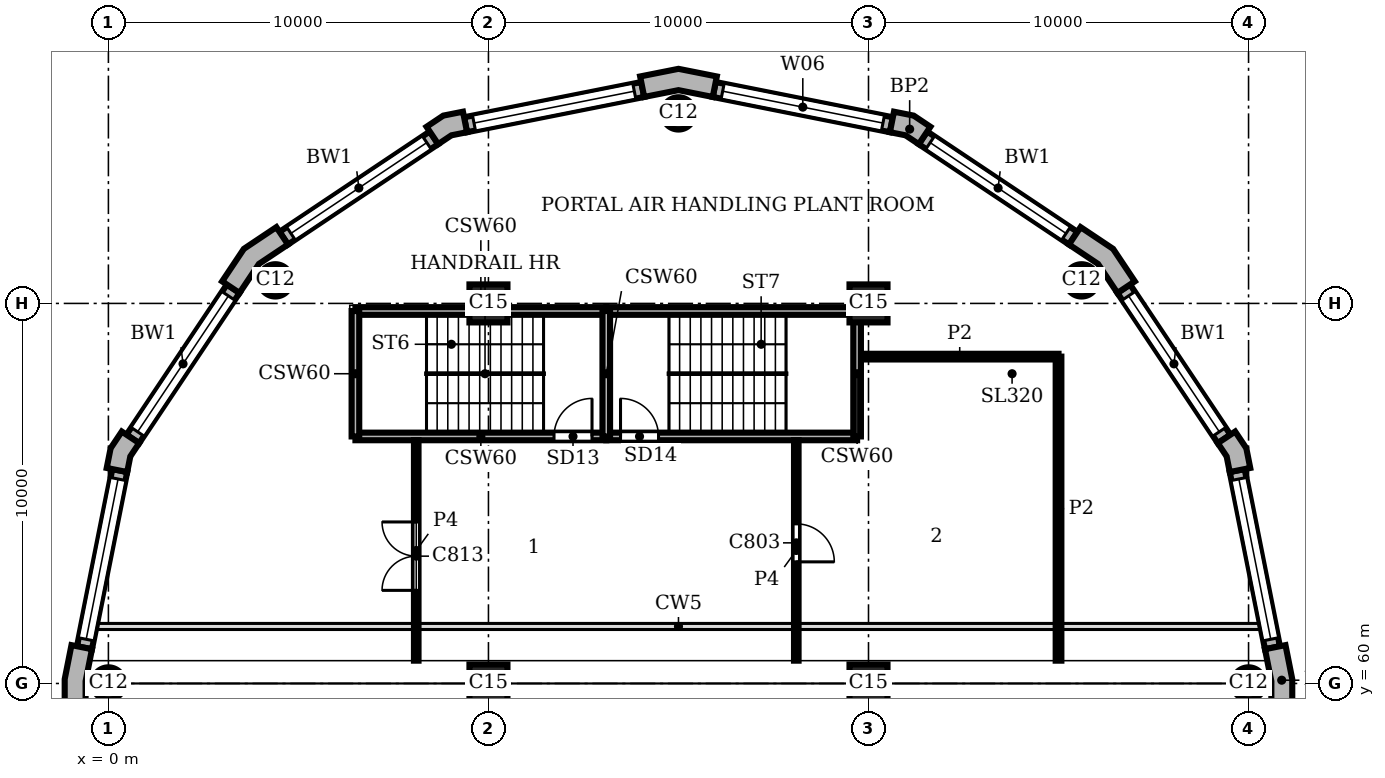
"""IFC4 building model, lengths in metres.
Left out: names, types, materials, properties, quantities, classifications, styles, units other than length and angle.
Written with IfcOpenShell. Run it as: python <this file> out.ifc"""

import sys

from ifc_helpers import new_model, si_unit, direction, frame, frame_2d, origin, origin_2d, place, context, subcontext, project, spatial, polyline, rectangle, circle, outline, extrude, element, fill, save


model = new_model("IFC4")
c1 = context("Model", 3, precision=1e-05, world=origin(), true_north=direction((0.0, 1.0)))
c2 = subcontext(c1, "Body", "Model", "MODEL_VIEW")
j1 = project(units=[si_unit("LENGTHUNIT", "METRE"), si_unit("PLANEANGLEUNIT", "RADIAN")], contexts=[c1])
p1 = place(None, origin())
s1 = spatial("IfcSite", under=j1, at=p1, CompositionType="ELEMENT")
p2 = place(p1, origin())
s2 = spatial("IfcBuilding", under=s1, at=p2, CompositionType="ELEMENT")
p3 = place(p2, frame((0.0, 0.0, 317.7)))
s3 = spatial("IfcBuildingStorey", under=s2, at=p3, CompositionType="ELEMENT", Elevation=317.7)
for number, where, z_axis, x_axis in (
    (1, (30.0, 60.0, 0.0), (0.0, 0.0, 1.0), (1.0, 0.0, 0.0)),
    (2, (25.607, 70.607, 0.0), (0.0, 0.0, 1.0), (1.0, 0.0, 0.0)),
    (3, (15.0, 75.0, 0.0), (0.0, 0.0, 1.0), (1.0, 0.0, 0.0)),
    (4, (4.393, 70.607, 0.0), (0.0, 0.0, 1.0), (1.0, 0.0, 0.0)),
    (5, (0.0, 60.0, 0.0), (0.0, 0.0, 1.0), (1.0, 0.0, 0.0)),
):
    element("IfcColumn", number, at=place(p3, frame(where, z_axis=z_axis, x_axis=x_axis)), inside=s3, PredefinedType="COLUMN", context=c2, shape_type="SweptSolid", body=[
        extrude(circle(Radius=0.425, at=origin_2d()), origin(), (0.0, 0.0, 1.0), 3.9),
    ])
for number, where, z_axis, x_axis in (
    (6, (10.0, 60.0, 0.0), (0.0, 0.0, 1.0), (1.0, 0.0, 0.0)),
    (7, (10.0, 70.0, 0.0), (0.0, 0.0, 1.0), (1.0, 0.0, 0.0)),
    (8, (20.0, 60.0, 0.0), (0.0, 0.0, 1.0), (1.0, 0.0, 0.0)),
    (9, (20.0, 70.0, 0.0), (0.0, 0.0, 1.0), (1.0, 0.0, 0.0)),
):
    element("IfcColumn", number, at=place(p3, frame(where, z_axis=z_axis, x_axis=x_axis)), inside=s3, PredefinedType="COLUMN", context=c2, shape_type="SweptSolid", body=[
        extrude(rectangle(XDim=1.0, YDim=1.0, at=origin_2d()), origin(), (0.0, 0.0, 1.0), 3.9),
    ])
p4 = place(p3, origin())
e10 = element("IfcWall", 10, at=p4, inside=s3, PredefinedType="SOLIDWALL", context=c2, shape_type="SweptSolid", body=[
    extrude(outline(polyline([(31.0, 59.2), (31.15, 59.2), (31.15, 60.113), (30.972, 61.009), (30.825, 60.98), (30.432, 60.902), (30.6, 60.059), (30.6, 59.2), (31.0, 59.2)])), origin(), (0.0, 0.0, 1.0), 3.9),
])
e11 = element("IfcWall", 11, at=p4, inside=s3, PredefinedType="SOLIDWALL", context=c2, shape_type="SweptSolid", body=[
    extrude(outline(polyline([(29.897, 65.641), (30.045, 65.67), (29.941, 66.189), (29.648, 66.629), (29.523, 66.545), (29.19, 66.323), (29.423, 65.974), (29.505, 65.563), (29.897, 65.641)])), origin(), (0.0, 0.0, 1.0), 3.9),
])
e12 = element("IfcWall", 12, at=p4, inside=s3, PredefinedType="SOLIDWALL", context=c2, shape_type="SweptSolid", body=[
    extrude(outline(polyline([(26.883, 70.497), (27.007, 70.58), (26.436, 71.436), (25.58, 72.007), (25.497, 71.883), (25.275, 71.55), (26.039, 71.039), (26.55, 70.275), (26.883, 70.497)])), origin(), (0.0, 0.0, 1.0), 3.9),
])
e13 = element("IfcWall", 13, at=p4, inside=s3, PredefinedType="SOLIDWALL", context=c2, shape_type="SweptSolid", body=[
    extrude(outline(polyline([(21.545, 74.523), (21.629, 74.648), (21.189, 74.941), (20.67, 75.045), (20.641, 74.897), (20.563, 74.505), (20.974, 74.423), (21.323, 74.19), (21.545, 74.523)])), origin(), (0.0, 0.0, 1.0), 3.9),
])
e14 = element("IfcWall", 14, at=p4, inside=s3, PredefinedType="SOLIDWALL", context=c2, shape_type="SweptSolid", body=[
    extrude(outline(polyline([(15.98, 75.825), (16.009, 75.972), (15.0, 76.173), (13.991, 75.972), (14.02, 75.825), (14.098, 75.432), (15.0, 75.612), (15.902, 75.432), (15.98, 75.825)])), origin(), (0.0, 0.0, 1.0), 3.9),
])
e15 = element("IfcWall", 15, at=p4, inside=s3, PredefinedType="SOLIDWALL", context=c2, shape_type="SweptSolid", body=[
    extrude(outline(polyline([(9.359, 74.897), (9.33, 75.045), (8.811, 74.941), (8.371, 74.648), (8.455, 74.523), (8.677, 74.19), (9.026, 74.423), (9.437, 74.505), (9.359, 74.897)])), origin(), (0.0, 0.0, 1.0), 3.9),
])
e16 = element("IfcWall", 16, at=p4, inside=s3, PredefinedType="SOLIDWALL", context=c2, shape_type="SweptSolid", body=[
    extrude(outline(polyline([(4.503, 71.883), (4.42, 72.007), (3.564, 71.436), (2.993, 70.58), (3.117, 70.497), (3.45, 70.275), (3.961, 71.039), (4.725, 71.55), (4.503, 71.883)])), origin(), (0.0, 0.0, 1.0), 3.9),
])
e17 = element("IfcWall", 17, at=p4, inside=s3, PredefinedType="SOLIDWALL", context=c2, shape_type="SweptSolid", body=[
    extrude(outline(polyline([(0.477, 66.545), (0.352, 66.629), (0.059, 66.189), (-0.045, 65.67), (0.103, 65.641), (0.495, 65.563), (0.577, 65.974), (0.81, 66.323), (0.477, 66.545)])), origin(), (0.0, 0.0, 1.0), 3.9),
])
e18 = element("IfcWall", 18, at=p4, inside=s3, PredefinedType="SOLIDWALL", context=c2, shape_type="SweptSolid", body=[
    extrude(outline(polyline([(-0.825, 60.98), (-0.972, 61.009), (-1.15, 60.113), (-1.15, 59.2), (-1.0, 59.2), (-0.6, 59.2), (-0.6, 60.059), (-0.432, 60.902), (-0.825, 60.98)])), origin(), (0.0, 0.0, 1.0), 3.9),
])
p5 = place(p3, frame((30.629, 60.941, 0.0), z_axis=(0.0, 0.0, 1.0), x_axis=(-0.195098533057, 0.98078364709, 0.0)))
e19 = element("IfcWall", 19, at=p5, inside=s3, PredefinedType="SOLIDWALL", context=c2, shape_type="SweptSolid", body=[
    extrude(rectangle(XDim=4.753, YDim=0.4, at=frame_2d((2.376, 0.0))), origin(), (0.0, 0.0, 1.0), 3.9),
])
p6 = place(p5, frame((0.226, 0.0, 0.9)))
e20 = element("IfcOpeningElement", 20, at=p6, cuts=e19, PredefinedType="OPENING", context=c2, shape_type="SweptSolid", body=[
    extrude(rectangle(XDim=4.3, YDim=2.35, at=frame_2d((2.15, 1.175))), frame((0.0, 0.21, 0.0), z_axis=(0.0, -1.0, 0.0), x_axis=(1.0, 0.0, 0.0)), (0.0, 0.0, 1.0), 0.42),
])
p7 = place(p3, frame((29.357, 66.434, 0.0), z_axis=(0.0, 0.0, 1.0), x_axis=(-0.555541552266, 0.831488775454, 0.0)))
e21 = element("IfcWall", 21, at=p7, inside=s3, PredefinedType="SOLIDWALL", context=c2, shape_type="SweptSolid", body=[
    extrude(rectangle(XDim=4.753, YDim=0.4, at=frame_2d((2.376, 0.0))), origin(), (0.0, 0.0, 1.0), 3.9),
])
p8 = place(p7, frame((0.226, 0.0, 0.9)))
e22 = element("IfcOpeningElement", 22, at=p8, cuts=e21, PredefinedType="OPENING", context=c2, shape_type="SweptSolid", body=[
    extrude(rectangle(XDim=4.3, YDim=2.35, at=frame_2d((2.15, 1.175))), frame((0.0, 0.21, 0.0), z_axis=(0.0, -1.0, 0.0), x_axis=(1.0, 0.0, 0.0)), (0.0, 0.0, 1.0), 0.42),
])
p9 = place(p3, frame((25.386, 71.716, 0.0), z_axis=(0.0, 0.0, 1.0), x_axis=(-0.831488775454, 0.555541552266, 0.0)))
e23 = element("IfcWall", 23, at=p9, inside=s3, PredefinedType="SOLIDWALL", context=c2, shape_type="SweptSolid", body=[
    extrude(rectangle(XDim=4.753, YDim=0.4, at=frame_2d((2.376, 0.0))), origin(), (0.0, 0.0, 1.0), 3.9),
])
p10 = place(p9, frame((0.226, 0.0, 0.9)))
e24 = element("IfcOpeningElement", 24, at=p10, cuts=e23, PredefinedType="OPENING", context=c2, shape_type="SweptSolid", body=[
    extrude(rectangle(XDim=4.3, YDim=2.35, at=frame_2d((2.15, 1.175))), frame((0.0, 0.21, 0.0), z_axis=(0.0, -1.0, 0.0), x_axis=(1.0, 0.0, 0.0)), (0.0, 0.0, 1.0), 0.42),
])
p11 = place(p3, frame((20.602, 74.701, 0.0), z_axis=(0.0, 0.0, 1.0), x_axis=(-0.98078364709, 0.195098533057, 0.0)))
e25 = element("IfcWall", 25, at=p11, inside=s3, PredefinedType="SOLIDWALL", context=c2, shape_type="SweptSolid", body=[
    extrude(rectangle(XDim=4.753, YDim=0.4, at=frame_2d((2.376, 0.0))), origin(), (0.0, 0.0, 1.0), 3.9),
])
p12 = place(p11, frame((0.226, 0.0, 0.9)))
e26 = element("IfcOpeningElement", 26, at=p12, cuts=e25, PredefinedType="OPENING", context=c2, shape_type="SweptSolid", body=[
    extrude(rectangle(XDim=4.3, YDim=2.35, at=frame_2d((2.15, 1.175))), frame((0.0, 0.21, 0.0), z_axis=(0.0, -1.0, 0.0), x_axis=(1.0, 0.0, 0.0)), (0.0, 0.0, 1.0), 0.42),
])
p13 = place(p3, frame((14.059, 75.629, 0.0), z_axis=(0.0, 0.0, 1.0), x_axis=(-0.98078364709, -0.195098533057, 0.0)))
e27 = element("IfcWall", 27, at=p13, inside=s3, PredefinedType="SOLIDWALL", context=c2, shape_type="SweptSolid", body=[
    extrude(rectangle(XDim=4.753, YDim=0.4, at=frame_2d((2.376, 0.0))), origin(), (0.0, 0.0, 1.0), 3.9),
])
p14 = place(p13, frame((0.226, 0.0, 0.9)))
e28 = element("IfcOpeningElement", 28, at=p14, cuts=e27, PredefinedType="OPENING", context=c2, shape_type="SweptSolid", body=[
    extrude(rectangle(XDim=4.3, YDim=2.35, at=frame_2d((2.15, 1.175))), frame((0.0, 0.21, 0.0), z_axis=(0.0, -1.0, 0.0), x_axis=(1.0, 0.0, 0.0)), (0.0, 0.0, 1.0), 0.42),
])
p15 = place(p3, frame((8.566, 74.357, 0.0), z_axis=(0.0, 0.0, 1.0), x_axis=(-0.831488775454, -0.555541552266, 0.0)))
e29 = element("IfcWall", 29, at=p15, inside=s3, PredefinedType="SOLIDWALL", context=c2, shape_type="SweptSolid", body=[
    extrude(rectangle(XDim=4.753, YDim=0.4, at=frame_2d((2.376, 0.0))), origin(), (0.0, 0.0, 1.0), 3.9),
])
p16 = place(p15, frame((0.226, 0.0, 0.9)))
e30 = element("IfcOpeningElement", 30, at=p16, cuts=e29, PredefinedType="OPENING", context=c2, shape_type="SweptSolid", body=[
    extrude(rectangle(XDim=4.3, YDim=2.35, at=frame_2d((2.15, 1.175))), frame((0.0, 0.21, 0.0), z_axis=(0.0, -1.0, 0.0), x_axis=(1.0, 0.0, 0.0)), (0.0, 0.0, 1.0), 0.42),
])
p17 = place(p3, frame((3.284, 70.386, 0.0), z_axis=(0.0, 0.0, 1.0), x_axis=(-0.555541552266, -0.831488775454, 0.0)))
e31 = element("IfcWall", 31, at=p17, inside=s3, PredefinedType="SOLIDWALL", context=c2, shape_type="SweptSolid", body=[
    extrude(rectangle(XDim=4.753, YDim=0.4, at=frame_2d((2.376, 0.0))), origin(), (0.0, 0.0, 1.0), 3.9),
])
p18 = place(p17, frame((0.226, 0.0, 0.9)))
e32 = element("IfcOpeningElement", 32, at=p18, cuts=e31, PredefinedType="OPENING", context=c2, shape_type="SweptSolid", body=[
    extrude(rectangle(XDim=4.3, YDim=2.35, at=frame_2d((2.15, 1.175))), frame((0.0, 0.21, 0.0), z_axis=(0.0, -1.0, 0.0), x_axis=(1.0, 0.0, 0.0)), (0.0, 0.0, 1.0), 0.42),
])
p19 = place(p3, frame((0.299, 65.602, 0.0), z_axis=(0.0, 0.0, 1.0), x_axis=(-0.195098533057, -0.98078364709, 0.0)))
e33 = element("IfcWall", 33, at=p19, inside=s3, PredefinedType="SOLIDWALL", context=c2, shape_type="SweptSolid", body=[
    extrude(rectangle(XDim=4.753, YDim=0.4, at=frame_2d((2.376, 0.0))), origin(), (0.0, 0.0, 1.0), 3.9),
])
p20 = place(p19, frame((0.226, 0.0, 0.9)))
e34 = element("IfcOpeningElement", 34, at=p20, cuts=e33, PredefinedType="OPENING", context=c2, shape_type="SweptSolid", body=[
    extrude(rectangle(XDim=4.3, YDim=2.35, at=frame_2d((2.15, 1.175))), frame((0.0, 0.21, 0.0), z_axis=(0.0, -1.0, 0.0), x_axis=(1.0, 0.0, 0.0)), (0.0, 0.0, 1.0), 0.42),
])
p21 = place(p3, frame((6.5, 66.5, 0.0), z_axis=(0.0, 0.0, 1.0), x_axis=(1.0, 0.0, 0.0)))
e35 = element("IfcWall", 35, at=p21, inside=s3, PredefinedType="SHEAR", context=c2, shape_type="SweptSolid", body=[
    extrude(rectangle(XDim=6.6, YDim=0.2, at=frame_2d((3.3, 0.0))), origin(), (0.0, 0.0, 1.0), 3.58),
])
p22 = place(p21, frame((5.225, 0.0, 0.0)))
e36 = element("IfcOpeningElement", 36, at=p22, cuts=e35, PredefinedType="OPENING", context=c2, shape_type="SweptSolid", body=[
    extrude(rectangle(XDim=1.0, YDim=2.1, at=frame_2d((0.5, 1.05))), frame((0.0, 0.11, 0.0), z_axis=(0.0, -1.0, 0.0), x_axis=(1.0, 0.0, 0.0)), (0.0, 0.0, 1.0), 0.22),
])
p23 = place(p3, frame((13.1, 66.5, 0.0), z_axis=(0.0, 0.0, 1.0), x_axis=(1.0, 0.0, 0.0)))
e37 = element("IfcWall", 37, at=p23, inside=s3, PredefinedType="SHEAR", context=c2, shape_type="SweptSolid", body=[
    extrude(rectangle(XDim=6.6, YDim=0.2, at=frame_2d((3.3, 0.0))), origin(), (0.0, 0.0, 1.0), 3.58),
])
p24 = place(p23, frame((0.375, 0.0, 0.0)))
e38 = element("IfcOpeningElement", 38, at=p24, cuts=e37, PredefinedType="OPENING", context=c2, shape_type="SweptSolid", body=[
    extrude(rectangle(XDim=1.0, YDim=2.1, at=frame_2d((0.5, 1.05))), frame((0.0, 0.11, 0.0), z_axis=(0.0, -1.0, 0.0), x_axis=(1.0, 0.0, 0.0)), (0.0, 0.0, 1.0), 0.22),
])
p25 = place(p3, frame((6.5, 69.8, 0.0), z_axis=(0.0, 0.0, 1.0), x_axis=(1.0, 0.0, 0.0)))
e39 = element("IfcWall", 39, at=p25, inside=s3, PredefinedType="SHEAR", context=c2, shape_type="SweptSolid", body=[
    extrude(rectangle(XDim=6.6, YDim=0.2, at=frame_2d((3.3, 0.0))), origin(), (0.0, 0.0, 1.0), 3.58),
])
p26 = place(p3, frame((13.1, 69.8, 0.0), z_axis=(0.0, 0.0, 1.0), x_axis=(1.0, 0.0, 0.0)))
e40 = element("IfcWall", 40, at=p26, inside=s3, PredefinedType="SHEAR", context=c2, shape_type="SweptSolid", body=[
    extrude(rectangle(XDim=6.6, YDim=0.2, at=frame_2d((3.3, 0.0))), origin(), (0.0, 0.0, 1.0), 3.58),
])
for number, where, z_axis, x_axis in (
    (41, (6.5, 66.5, 0.0), (0.0, 0.0, 1.0), (0.0, 1.0, 0.0)),
    (42, (13.1, 66.5, 0.0), (0.0, 0.0, 1.0), (0.0, 1.0, 0.0)),
    (43, (19.7, 66.5, 0.0), (0.0, 0.0, 1.0), (0.0, 1.0, 0.0)),
):
    element("IfcWall", number, at=place(p3, frame(where, z_axis=z_axis, x_axis=x_axis)), inside=s3, PredefinedType="SHEAR", context=c2, shape_type="SweptSolid", body=[
        extrude(rectangle(XDim=3.3, YDim=0.2, at=frame_2d((1.65, 0.0))), origin(), (0.0, 0.0, 1.0), 3.58),
    ])
p27 = place(p3, frame((25.0, 60.6, 0.0), z_axis=(0.0, 0.0, 1.0), x_axis=(0.0, 1.0, 0.0)))
e44 = element("IfcWall", 44, at=p27, inside=s3, PredefinedType="PARTITIONING", context=c2, shape_type="SweptSolid", body=[
    extrude(rectangle(XDim=8.0, YDim=0.15, at=frame_2d((4.0, 0.0))), origin(), (0.0, 0.0, 1.0), 3.58),
])
p28 = place(p3, frame((19.8, 68.6, 0.0), z_axis=(0.0, 0.0, 1.0), x_axis=(1.0, 0.0, 0.0)))
e45 = element("IfcWall", 45, at=p28, inside=s3, PredefinedType="PARTITIONING", context=c2, shape_type="SweptSolid", body=[
    extrude(rectangle(XDim=5.2, YDim=0.15, at=frame_2d((2.6, 0.0))), origin(), (0.0, 0.0, 1.0), 3.58),
])
p29 = place(p3, frame((8.1, 60.6, 0.0), z_axis=(0.0, 0.0, 1.0), x_axis=(0.0, 1.0, 0.0)))
e46 = element("IfcWall", 46, at=p29, inside=s3, PredefinedType="PARTITIONING", context=c2, shape_type="SweptSolid", body=[
    extrude(rectangle(XDim=5.8, YDim=0.12, at=frame_2d((2.9, 0.0))), origin(), (0.0, 0.0, 1.0), 3.58),
])
p30 = place(p29, frame((1.85, 0.0, 0.0)))
e47 = element("IfcOpeningElement", 47, at=p30, cuts=e46, PredefinedType="OPENING", context=c2, shape_type="SweptSolid", body=[
    extrude(rectangle(XDim=1.8, YDim=2.1, at=frame_2d((0.9, 1.05))), frame((0.0, 0.07, 0.0), z_axis=(0.0, -1.0, 0.0), x_axis=(1.0, 0.0, 0.0)), (0.0, 0.0, 1.0), 0.14),
])
p31 = place(p3, frame((18.1, 60.6, 0.0), z_axis=(0.0, 0.0, 1.0), x_axis=(0.0, 1.0, 0.0)))
e48 = element("IfcWall", 48, at=p31, inside=s3, PredefinedType="PARTITIONING", context=c2, shape_type="SweptSolid", body=[
    extrude(rectangle(XDim=5.8, YDim=0.12, at=frame_2d((2.9, 0.0))), origin(), (0.0, 0.0, 1.0), 3.58),
])
p32 = place(p31, frame((2.6, 0.0, 0.0)))
e49 = element("IfcOpeningElement", 49, at=p32, cuts=e48, PredefinedType="OPENING", context=c2, shape_type="SweptSolid", body=[
    extrude(rectangle(XDim=1.0, YDim=2.1, at=frame_2d((0.5, 1.05))), frame((0.0, 0.07, 0.0), z_axis=(0.0, -1.0, 0.0), x_axis=(1.0, 0.0, 0.0)), (0.0, 0.0, 1.0), 0.14),
])
p33 = place(p6, origin())
e50 = element("IfcWindow", 50, at=p33, inside=s3, PartitioningType="SINGLE_PANEL", PredefinedType="WINDOW", context=c2, shape_type="SweptSolid", body=[
    extrude(rectangle(XDim=4.3, YDim=2.35, at=frame_2d((2.15, 1.175))), frame((0.0, 0.16, 0.0), z_axis=(0.0, -1.0, 0.0), x_axis=(1.0, 0.0, 0.0)), (0.0, 0.0, 1.0), 0.06),
])
fill(e20, e50)
p34 = place(p8, origin())
e51 = element("IfcWindow", 51, at=p34, inside=s3, PartitioningType="SINGLE_PANEL", PredefinedType="WINDOW", context=c2, shape_type="SweptSolid", body=[
    extrude(rectangle(XDim=4.3, YDim=2.35, at=frame_2d((2.15, 1.175))), frame((0.0, 0.16, 0.0), z_axis=(0.0, -1.0, 0.0), x_axis=(1.0, 0.0, 0.0)), (0.0, 0.0, 1.0), 0.06),
])
fill(e22, e51)
p35 = place(p10, origin())
e52 = element("IfcWindow", 52, at=p35, inside=s3, PartitioningType="SINGLE_PANEL", PredefinedType="WINDOW", context=c2, shape_type="SweptSolid", body=[
    extrude(rectangle(XDim=4.3, YDim=2.35, at=frame_2d((2.15, 1.175))), frame((0.0, 0.16, 0.0), z_axis=(0.0, -1.0, 0.0), x_axis=(1.0, 0.0, 0.0)), (0.0, 0.0, 1.0), 0.06),
])
fill(e24, e52)
p36 = place(p12, origin())
e53 = element("IfcWindow", 53, at=p36, inside=s3, PartitioningType="SINGLE_PANEL", PredefinedType="WINDOW", context=c2, shape_type="SweptSolid", body=[
    extrude(rectangle(XDim=4.3, YDim=2.35, at=frame_2d((2.15, 1.175))), frame((0.0, 0.16, 0.0), z_axis=(0.0, -1.0, 0.0), x_axis=(1.0, 0.0, 0.0)), (0.0, 0.0, 1.0), 0.06),
])
fill(e26, e53)
p37 = place(p14, origin())
e54 = element("IfcWindow", 54, at=p37, inside=s3, PartitioningType="SINGLE_PANEL", PredefinedType="WINDOW", context=c2, shape_type="SweptSolid", body=[
    extrude(rectangle(XDim=4.3, YDim=2.35, at=frame_2d((2.15, 1.175))), frame((0.0, 0.16, 0.0), z_axis=(0.0, -1.0, 0.0), x_axis=(1.0, 0.0, 0.0)), (0.0, 0.0, 1.0), 0.06),
])
fill(e28, e54)
p38 = place(p16, origin())
e55 = element("IfcWindow", 55, at=p38, inside=s3, PartitioningType="SINGLE_PANEL", PredefinedType="WINDOW", context=c2, shape_type="SweptSolid", body=[
    extrude(rectangle(XDim=4.3, YDim=2.35, at=frame_2d((2.15, 1.175))), frame((0.0, 0.16, 0.0), z_axis=(0.0, -1.0, 0.0), x_axis=(1.0, 0.0, 0.0)), (0.0, 0.0, 1.0), 0.06),
])
fill(e30, e55)
p39 = place(p18, origin())
e56 = element("IfcWindow", 56, at=p39, inside=s3, PartitioningType="SINGLE_PANEL", PredefinedType="WINDOW", context=c2, shape_type="SweptSolid", body=[
    extrude(rectangle(XDim=4.3, YDim=2.35, at=frame_2d((2.15, 1.175))), frame((0.0, 0.16, 0.0), z_axis=(0.0, -1.0, 0.0), x_axis=(1.0, 0.0, 0.0)), (0.0, 0.0, 1.0), 0.06),
])
fill(e32, e56)
p40 = place(p20, origin())
e57 = element("IfcWindow", 57, at=p40, inside=s3, PartitioningType="SINGLE_PANEL", PredefinedType="WINDOW", context=c2, shape_type="SweptSolid", body=[
    extrude(rectangle(XDim=4.3, YDim=2.35, at=frame_2d((2.15, 1.175))), frame((0.0, 0.16, 0.0), z_axis=(0.0, -1.0, 0.0), x_axis=(1.0, 0.0, 0.0)), (0.0, 0.0, 1.0), 0.06),
])
fill(e34, e57)
p41 = place(p22, origin())
e58 = element("IfcDoor", 58, at=p41, inside=s3, OperationType="SINGLE_SWING_RIGHT", PredefinedType="DOOR", context=c2, shape_type="SweptSolid", body=[
    extrude(rectangle(XDim=1.0, YDim=2.1, at=frame_2d((0.5, 1.05))), frame((0.0, 0.025, 0.0), z_axis=(0.0, -1.0, 0.0), x_axis=(1.0, 0.0, 0.0)), (0.0, 0.0, 1.0), 0.05),
])
fill(e36, e58)
p42 = place(p24, origin())
e59 = element("IfcDoor", 59, at=p42, inside=s3, OperationType="SINGLE_SWING_LEFT", PredefinedType="DOOR", context=c2, shape_type="SweptSolid", body=[
    extrude(rectangle(XDim=1.0, YDim=2.1, at=frame_2d((0.5, 1.05))), frame((0.0, 0.025, 0.0), z_axis=(0.0, -1.0, 0.0), x_axis=(1.0, 0.0, 0.0)), (0.0, 0.0, 1.0), 0.05),
])
fill(e38, e59)
p43 = place(p32, frame((1.0, 0.0, 0.0), z_axis=(0.0, 0.0, 1.0), x_axis=(-1.0, 0.0, 0.0)))
e60 = element("IfcDoor", 60, at=p43, inside=s3, OperationType="SINGLE_SWING_RIGHT", PredefinedType="DOOR", context=c2, shape_type="SweptSolid", body=[
    extrude(rectangle(XDim=1.0, YDim=2.1, at=frame_2d((0.5, 1.05))), frame((0.0, 0.025, 0.0), z_axis=(0.0, -1.0, 0.0), x_axis=(1.0, 0.0, 0.0)), (0.0, 0.0, 1.0), 0.05),
])
fill(e49, e60)
p44 = place(p30, origin())
e61 = element("IfcDoor", 61, at=p44, inside=s3, OperationType="DOUBLE_DOOR_SINGLE_SWING", PredefinedType="DOOR", context=c2, shape_type="SweptSolid", body=[
    extrude(rectangle(XDim=1.8, YDim=2.1, at=frame_2d((0.9, 1.05))), frame((0.0, 0.025, 0.0), z_axis=(0.0, -1.0, 0.0), x_axis=(1.0, 0.0, 0.0)), (0.0, 0.0, 1.0), 0.05),
])
fill(e47, e61)
save(model, sys.argv[1])
